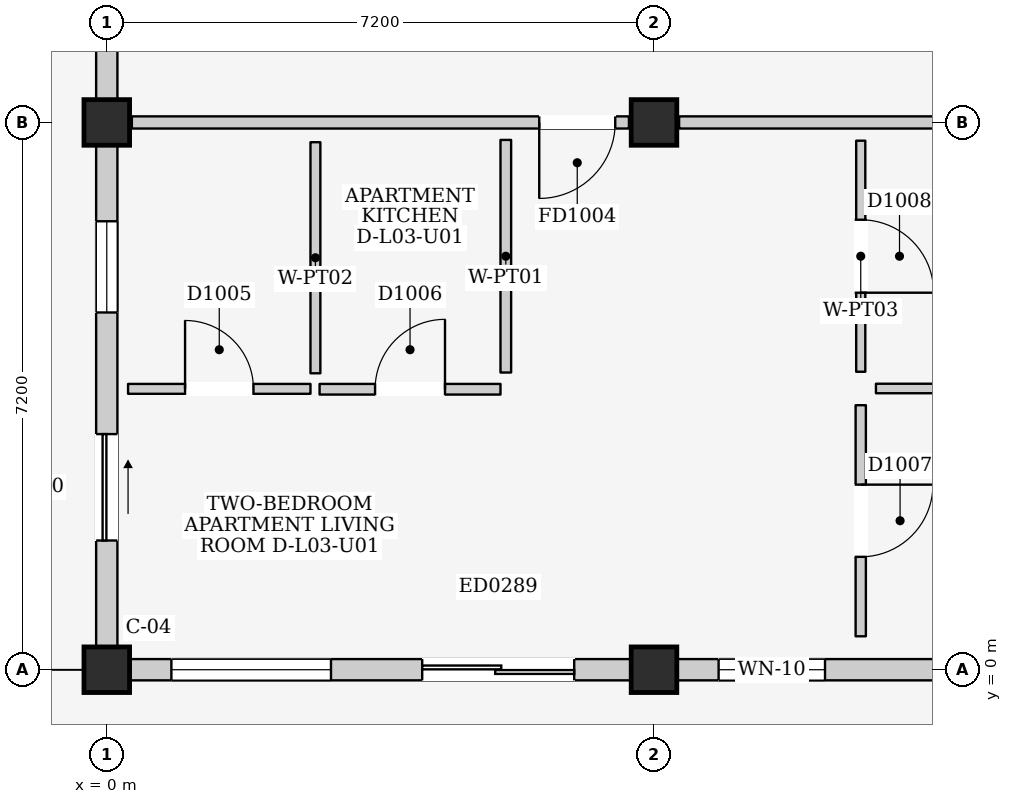
"""IFC4 building model, lengths in metres.
Left out: names, types, materials, properties, quantities, classifications, styles, units other than length and angle.
Written with IfcOpenShell. Run it as: python <this file> out.ifc"""

import sys

from ifc_helpers import new_model, si_unit, direction, frame, frame_2d, origin, origin_2d, place, context, subcontext, project, spatial, rectangle, extrude, element, fill, save


model = new_model("IFC4")
c1 = context("Model", 3, precision=1e-05, world=origin(), true_north=direction((0.0, 1.0)))
c2 = subcontext(c1, "Body", "Model", "MODEL_VIEW")
j1 = project(units=[si_unit("LENGTHUNIT", "METRE"), si_unit("PLANEANGLEUNIT", "RADIAN")], contexts=[c1])
p1 = place(None, origin())
s1 = spatial("IfcSite", under=j1, at=p1, CompositionType="ELEMENT")
p2 = place(p1, origin())
s2 = spatial("IfcBuilding", under=s1, at=p2, CompositionType="ELEMENT")
p3 = place(p2, frame((0.0, 0.0, 12.2)))
s3 = spatial("IfcBuildingStorey", under=s2, at=p3, CompositionType="ELEMENT", Elevation=12.2)
for number, where, z_axis, x_axis in (
    (1, (0.0, 0.0, 0.0), (0.0, 0.0, 1.0), (1.0, 0.0, 0.0)),
    (2, (0.0, 7.2, 0.0), (0.0, 0.0, 1.0), (1.0, 0.0, 0.0)),
    (3, (7.2, 0.0, 0.0), (0.0, 0.0, 1.0), (1.0, 0.0, 0.0)),
    (4, (7.2, 7.2, 0.0), (0.0, 0.0, 1.0), (1.0, 0.0, 0.0)),
):
    element("IfcColumn", number, at=place(p3, frame(where, z_axis=z_axis, x_axis=x_axis)), inside=s3, PredefinedType="COLUMN", context=c2, shape_type="SweptSolid", body=[
        extrude(rectangle(XDim=0.6, YDim=0.6, at=origin_2d()), origin(), (0.0, 0.0, 1.0), 3.2),
    ])
p4 = place(p3, frame((0.3, 0.0, 0.0), z_axis=(0.0, 0.0, 1.0), x_axis=(1.0, 0.0, 0.0)))
e5 = element("IfcWall", 5, at=p4, inside=s3, PredefinedType="ELEMENTEDWALL", context=c2, shape_type="SweptSolid", body=[
    extrude(rectangle(XDim=6.6, YDim=0.28, at=frame_2d((3.3, 0.0))), origin(), (0.0, 0.0, 1.0), 2.445),
])
p5 = place(p4, frame((3.85, 0.0, 0.0)))
e6 = element("IfcOpeningElement", 6, at=p5, cuts=e5, PredefinedType="OPENING", context=c2, shape_type="SweptSolid", body=[
    extrude(rectangle(XDim=2.0, YDim=2.12, at=frame_2d((1.0, 1.06))), frame((0.0, 0.155, 0.0), z_axis=(0.0, -1.0, 0.0), x_axis=(1.0, 0.0, 0.0)), (0.0, 0.0, 1.0), 0.31),
])
p6 = place(p4, frame((0.55, 0.0, 0.685)))
e7 = element("IfcOpeningElement", 7, at=p6, cuts=e5, PredefinedType="OPENING", context=c2, shape_type="SweptSolid", body=[
    extrude(rectangle(XDim=2.1, YDim=1.65, at=frame_2d((1.05, 0.825))), frame((0.0, 0.155, 0.0), z_axis=(0.0, -1.0, 0.0), x_axis=(1.0, 0.0, 0.0)), (0.0, 0.0, 1.0), 0.31),
])
p7 = place(p3, frame((0.0, 0.3, 0.0), z_axis=(0.0, 0.0, 1.0), x_axis=(0.0, 1.0, 0.0)))
e8 = element("IfcWall", 8, at=p7, inside=s3, PredefinedType="ELEMENTEDWALL", context=c2, shape_type="SweptSolid", body=[
    extrude(rectangle(XDim=6.6, YDim=0.28, at=frame_2d((3.3, 0.0))), origin(), (0.0, 0.0, 1.0), 2.445),
])
p8 = place(p7, frame((1.4, 0.0, 0.0)))
e9 = element("IfcOpeningElement", 9, at=p8, cuts=e8, PredefinedType="OPENING", context=c2, shape_type="SweptSolid", body=[
    extrude(rectangle(XDim=1.4, YDim=2.1, at=frame_2d((0.7, 1.05))), frame((0.0, 0.155, 0.0), z_axis=(0.0, -1.0, 0.0), x_axis=(1.0, 0.0, 0.0)), (0.0, 0.0, 1.0), 0.31),
])
p9 = place(p7, frame((4.4, 0.0, 0.95)))
e10 = element("IfcOpeningElement", 10, at=p9, cuts=e8, PredefinedType="OPENING", context=c2, shape_type="SweptSolid", body=[
    extrude(rectangle(XDim=1.2, YDim=1.35, at=frame_2d((0.6, 0.675))), frame((0.0, 0.155, 0.0), z_axis=(0.0, -1.0, 0.0), x_axis=(1.0, 0.0, 0.0)), (0.0, 0.0, 1.0), 0.31),
])
p10 = place(p3, frame((0.0, 7.5, 0.0), z_axis=(0.0, 0.0, 1.0), x_axis=(0.0, 1.0, 0.0)))
e11 = element("IfcWall", 11, at=p10, inside=s3, PredefinedType="ELEMENTEDWALL", context=c2, shape_type="SweptSolid", body=[
    extrude(rectangle(XDim=6.6, YDim=0.28, at=frame_2d((3.3, 0.0))), origin(), (0.0, 0.0, 1.0), 2.445),
])
p11 = place(p10, frame((3.65, 0.0, 0.0)))
e12 = element("IfcOpeningElement", 12, at=p11, cuts=e11, PredefinedType="OPENING", context=c2, shape_type="SweptSolid", body=[
    extrude(rectangle(XDim=1.4, YDim=2.1, at=frame_2d((0.7, 1.05))), frame((0.0, 0.155, 0.0), z_axis=(0.0, -1.0, 0.0), x_axis=(1.0, 0.0, 0.0)), (0.0, 0.0, 1.0), 0.31),
])
p12 = place(p3, frame((7.5, 0.0, 0.0), z_axis=(0.0, 0.0, 1.0), x_axis=(1.0, 0.0, 0.0)))
e13 = element("IfcWall", 13, at=p12, inside=s3, PredefinedType="ELEMENTEDWALL", context=c2, shape_type="SweptSolid", body=[
    extrude(rectangle(XDim=6.6, YDim=0.28, at=frame_2d((3.3, 0.0))), origin(), (0.0, 0.0, 1.0), 2.445),
])
p13 = place(p12, frame((3.85, 0.0, 0.0)))
e14 = element("IfcOpeningElement", 14, at=p13, cuts=e13, PredefinedType="OPENING", context=c2, shape_type="SweptSolid", body=[
    extrude(rectangle(XDim=1.4, YDim=2.1, at=frame_2d((0.7, 1.05))), frame((0.0, 0.155, 0.0), z_axis=(0.0, -1.0, 0.0), x_axis=(1.0, 0.0, 0.0)), (0.0, 0.0, 1.0), 0.31),
])
p14 = place(p12, frame((0.55, 0.0, 0.9)))
e15 = element("IfcOpeningElement", 15, at=p14, cuts=e13, PredefinedType="OPENING", context=c2, shape_type="SweptSolid", body=[
    extrude(rectangle(XDim=1.4, YDim=1.2, at=frame_2d((0.7, 0.6))), frame((0.0, 0.155, 0.0), z_axis=(0.0, -1.0, 0.0), x_axis=(1.0, 0.0, 0.0)), (0.0, 0.0, 1.0), 0.31),
])
p15 = place(p3, frame((0.33, 7.2, 0.0), z_axis=(0.0, 0.0, 1.0), x_axis=(1.0, 0.0, 0.0)))
e16 = element("IfcWall", 16, at=p15, inside=s3, PredefinedType="PARTITIONING", context=c2, shape_type="SweptSolid", body=[
    extrude(rectangle(XDim=6.54, YDim=0.16, at=frame_2d((3.27, 0.0))), origin(), (0.0, 0.0, 1.0), 2.365),
])
p16 = place(p15, frame((5.36, 0.0, 0.0)))
e17 = element("IfcOpeningElement", 17, at=p16, cuts=e16, PredefinedType="OPENING", context=c2, shape_type="SweptSolid", body=[
    extrude(rectangle(XDim=1.0, YDim=2.15, at=frame_2d((0.5, 1.075))), frame((0.0, 0.095, 0.0), z_axis=(0.0, -1.0, 0.0), x_axis=(1.0, 0.0, 0.0)), (0.0, 0.0, 1.0), 0.19),
])
p17 = place(p3, frame((7.53, 7.2, 0.0), z_axis=(0.0, 0.0, 1.0), x_axis=(1.0, 0.0, 0.0)))
e18 = element("IfcWall", 18, at=p17, inside=s3, PredefinedType="PARTITIONING", context=c2, shape_type="SweptSolid", body=[
    extrude(rectangle(XDim=6.54, YDim=0.16, at=frame_2d((3.27, 0.0))), origin(), (0.0, 0.0, 1.0), 2.365),
])
p18 = place(p3, frame((0.28, 3.695, 0.0), z_axis=(0.0, 0.0, 1.0), x_axis=(1.0, 0.0, 0.0)))
e19 = element("IfcWall", 19, at=p18, inside=s3, PredefinedType="PARTITIONING", context=c2, shape_type="SweptSolid", body=[
    extrude(rectangle(XDim=2.4, YDim=0.13, at=frame_2d((1.2, 0.0))), origin(), (0.0, 0.0, 1.0), 2.98),
])
p19 = place(p18, frame((0.75, 0.0, 0.0)))
e20 = element("IfcOpeningElement", 20, at=p19, cuts=e19, PredefinedType="OPENING", context=c2, shape_type="SweptSolid", body=[
    extrude(rectangle(XDim=0.9, YDim=2.1, at=frame_2d((0.45, 1.05))), frame((0.0, 0.08, 0.0), z_axis=(0.0, -1.0, 0.0), x_axis=(1.0, 0.0, 0.0)), (0.0, 0.0, 1.0), 0.16),
])
p20 = place(p3, frame((2.745, 3.9, 0.0), z_axis=(0.0, 0.0, 1.0), x_axis=(0.0, 1.0, 0.0)))
e21 = element("IfcWall", 21, at=p20, inside=s3, PredefinedType="PARTITIONING", context=c2, shape_type="SweptSolid", body=[
    extrude(rectangle(XDim=3.04, YDim=0.13, at=frame_2d((1.52, 0.0))), origin(), (0.0, 0.0, 1.0), 2.98),
])
p21 = place(p3, frame((2.8, 3.69, 0.0), z_axis=(0.0, 0.0, 1.0), x_axis=(1.0, 0.0, 0.0)))
e22 = element("IfcWall", 22, at=p21, inside=s3, PredefinedType="PARTITIONING", context=c2, shape_type="SweptSolid", body=[
    extrude(rectangle(XDim=2.38, YDim=0.14, at=frame_2d((1.19, 0.0))), origin(), (0.0, 0.0, 1.0), 2.98),
])
p22 = place(p21, frame((0.73, 0.0, 0.0)))
e23 = element("IfcOpeningElement", 23, at=p22, cuts=e22, PredefinedType="OPENING", context=c2, shape_type="SweptSolid", body=[
    extrude(rectangle(XDim=0.92, YDim=2.1, at=frame_2d((0.46, 1.05))), frame((0.0, 0.085, 0.0), z_axis=(0.0, -1.0, 0.0), x_axis=(1.0, 0.0, 0.0)), (0.0, 0.0, 1.0), 0.17),
])
p23 = place(p3, frame((5.25, 3.91, 0.0), z_axis=(0.0, 0.0, 1.0), x_axis=(0.0, 1.0, 0.0)))
e24 = element("IfcWall", 24, at=p23, inside=s3, PredefinedType="PARTITIONING", context=c2, shape_type="SweptSolid", body=[
    extrude(rectangle(XDim=3.06, YDim=0.14, at=frame_2d((1.53, 0.0))), origin(), (0.0, 0.0, 1.0), 2.98),
])
p24 = place(p3, frame((9.92, 0.44, 0.0), z_axis=(0.0, 0.0, 1.0), x_axis=(0.0, 1.0, 0.0)))
e25 = element("IfcWall", 25, at=p24, inside=s3, PredefinedType="PARTITIONING", context=c2, shape_type="SweptSolid", body=[
    extrude(rectangle(XDim=3.04, YDim=0.135, at=frame_2d((1.52, 0.0))), origin(), (0.0, 0.0, 1.0), 2.98),
])
p25 = place(p24, frame((1.045, 0.0, 0.0)))
e26 = element("IfcOpeningElement", 26, at=p25, cuts=e25, PredefinedType="OPENING", context=c2, shape_type="SweptSolid", body=[
    extrude(rectangle(XDim=0.95, YDim=2.15, at=frame_2d((0.475, 1.075))), frame((0.0, 0.083, 0.0), z_axis=(0.0, -1.0, 0.0), x_axis=(1.0, 0.0, 0.0)), (0.0, 0.0, 1.0), 0.165),
])
p26 = place(p3, frame((10.12, 3.7, 0.0), z_axis=(0.0, 0.0, 1.0), x_axis=(1.0, 0.0, 0.0)))
e27 = element("IfcWall", 27, at=p26, inside=s3, PredefinedType="PARTITIONING", context=c2, shape_type="SweptSolid", body=[
    extrude(rectangle(XDim=4.06, YDim=0.125, at=frame_2d((2.03, 0.0))), origin(), (0.0, 0.0, 1.0), 2.98),
])
p27 = place(p3, frame((9.92, 3.92, 0.0), z_axis=(0.0, 0.0, 1.0), x_axis=(0.0, 1.0, 0.0)))
e28 = element("IfcWall", 28, at=p27, inside=s3, PredefinedType="PARTITIONING", context=c2, shape_type="SweptSolid", body=[
    extrude(rectangle(XDim=3.04, YDim=0.12, at=frame_2d((1.52, 0.0))), origin(), (0.0, 0.0, 1.0), 2.98),
])
p28 = place(p27, frame((1.04, 0.0, 0.0)))
e29 = element("IfcOpeningElement", 29, at=p28, cuts=e28, PredefinedType="OPENING", context=c2, shape_type="SweptSolid", body=[
    extrude(rectangle(XDim=0.96, YDim=2.15, at=frame_2d((0.48, 1.075))), frame((0.0, 0.075, 0.0), z_axis=(0.0, -1.0, 0.0), x_axis=(1.0, 0.0, 0.0)), (0.0, 0.0, 1.0), 0.15),
])
p29 = place(p5, frame((2.0, 0.0, 0.0), z_axis=(0.0, 0.0, 1.0), x_axis=(-1.0, 0.0, 0.0)))
e30 = element("IfcDoor", 30, at=p29, inside=s3, OperationType="DOUBLE_DOOR_SLIDING", PredefinedType="DOOR", context=c2, shape_type="SweptSolid", body=[
    extrude(rectangle(XDim=2.0, YDim=2.12, at=frame_2d((1.0, 1.06))), frame((0.0, 0.025, 0.0), z_axis=(0.0, -1.0, 0.0), x_axis=(1.0, 0.0, 0.0)), (0.0, 0.0, 1.0), 0.05),
])
fill(e6, e30)
p30 = place(p6, origin())
e31 = element("IfcWindow", 31, at=p30, inside=s3, PartitioningType="DOUBLE_PANEL_VERTICAL", PredefinedType="WINDOW", context=c2, shape_type="SweptSolid", body=[
    extrude(rectangle(XDim=2.1, YDim=1.65, at=frame_2d((1.05, 0.825))), frame((0.0, 0.03, 0.0), z_axis=(0.0, -1.0, 0.0), x_axis=(1.0, 0.0, 0.0)), (0.0, 0.0, 1.0), 0.06),
])
fill(e7, e31)
p31 = place(p8, frame((1.4, 0.0, 0.0), z_axis=(0.0, 0.0, 1.0), x_axis=(-1.0, 0.0, 0.0)))
e32 = element("IfcDoor", 32, at=p31, inside=s3, OperationType="SLIDING_TO_RIGHT", PredefinedType="DOOR", context=c2, shape_type="SweptSolid", body=[
    extrude(rectangle(XDim=1.4, YDim=2.1, at=frame_2d((0.7, 1.05))), frame((0.0, 0.025, 0.0), z_axis=(0.0, -1.0, 0.0), x_axis=(1.0, 0.0, 0.0)), (0.0, 0.0, 1.0), 0.05),
])
fill(e9, e32)
p32 = place(p9, origin())
e33 = element("IfcWindow", 33, at=p32, inside=s3, PartitioningType="SINGLE_PANEL", PredefinedType="WINDOW", context=c2, shape_type="SweptSolid", body=[
    extrude(rectangle(XDim=1.2, YDim=1.35, at=frame_2d((0.6, 0.675))), frame((0.0, 0.03, 0.0), z_axis=(0.0, -1.0, 0.0), x_axis=(1.0, 0.0, 0.0)), (0.0, 0.0, 1.0), 0.06),
])
fill(e10, e33)
p33 = place(p14, origin())
e34 = element("IfcWindow", 34, at=p33, inside=s3, PartitioningType="DOUBLE_PANEL_HORIZONTAL", PredefinedType="WINDOW", context=c2, shape_type="SweptSolid", body=[
    extrude(rectangle(XDim=1.4, YDim=1.2, at=frame_2d((0.7, 0.6))), frame((0.0, 0.03, 0.0), z_axis=(0.0, -1.0, 0.0), x_axis=(1.0, 0.0, 0.0)), (0.0, 0.0, 1.0), 0.06),
])
fill(e15, e34)
p34 = place(p16, frame((1.0, 0.0, 0.0), z_axis=(0.0, 0.0, 1.0), x_axis=(-1.0, 0.0, 0.0)))
e35 = element("IfcDoor", 35, at=p34, inside=s3, OperationType="SINGLE_SWING_RIGHT", PredefinedType="DOOR", context=c2, shape_type="SweptSolid", body=[
    extrude(rectangle(XDim=1.0, YDim=2.15, at=frame_2d((0.5, 1.075))), frame((0.0, 0.025, 0.0), z_axis=(0.0, -1.0, 0.0), x_axis=(1.0, 0.0, 0.0)), (0.0, 0.0, 1.0), 0.05),
])
fill(e17, e35)
p35 = place(p19, origin())
e36 = element("IfcDoor", 36, at=p35, inside=s3, OperationType="SINGLE_SWING_LEFT", PredefinedType="DOOR", context=c2, shape_type="SweptSolid", body=[
    extrude(rectangle(XDim=0.9, YDim=2.1, at=frame_2d((0.45, 1.05))), frame((0.0, 0.025, 0.0), z_axis=(0.0, -1.0, 0.0), x_axis=(1.0, 0.0, 0.0)), (0.0, 0.0, 1.0), 0.05),
])
fill(e20, e36)
p36 = place(p22, origin())
e37 = element("IfcDoor", 37, at=p36, inside=s3, OperationType="SINGLE_SWING_RIGHT", PredefinedType="DOOR", context=c2, shape_type="SweptSolid", body=[
    extrude(rectangle(XDim=0.92, YDim=2.1, at=frame_2d((0.46, 1.05))), frame((0.0, 0.025, 0.0), z_axis=(0.0, -1.0, 0.0), x_axis=(1.0, 0.0, 0.0)), (0.0, 0.0, 1.0), 0.05),
])
fill(e23, e37)
p37 = place(p25, frame((0.95, 0.0, 0.0), z_axis=(0.0, 0.0, 1.0), x_axis=(-1.0, 0.0, 0.0)))
e38 = element("IfcDoor", 38, at=p37, inside=s3, OperationType="SINGLE_SWING_LEFT", PredefinedType="DOOR", context=c2, shape_type="SweptSolid", body=[
    extrude(rectangle(XDim=0.95, YDim=2.15, at=frame_2d((0.475, 1.075))), frame((0.0, 0.025, 0.0), z_axis=(0.0, -1.0, 0.0), x_axis=(1.0, 0.0, 0.0)), (0.0, 0.0, 1.0), 0.05),
])
fill(e26, e38)
p38 = place(p28, frame((0.96, 0.0, 0.0), z_axis=(0.0, 0.0, 1.0), x_axis=(-1.0, 0.0, 0.0)))
e39 = element("IfcDoor", 39, at=p38, inside=s3, OperationType="SINGLE_SWING_RIGHT", PredefinedType="DOOR", context=c2, shape_type="SweptSolid", body=[
    extrude(rectangle(XDim=0.96, YDim=2.15, at=frame_2d((0.48, 1.075))), frame((0.0, 0.025, 0.0), z_axis=(0.0, -1.0, 0.0), x_axis=(1.0, 0.0, 0.0)), (0.0, 0.0, 1.0), 0.05),
])
fill(e29, e39)
save(model, sys.argv[1])
